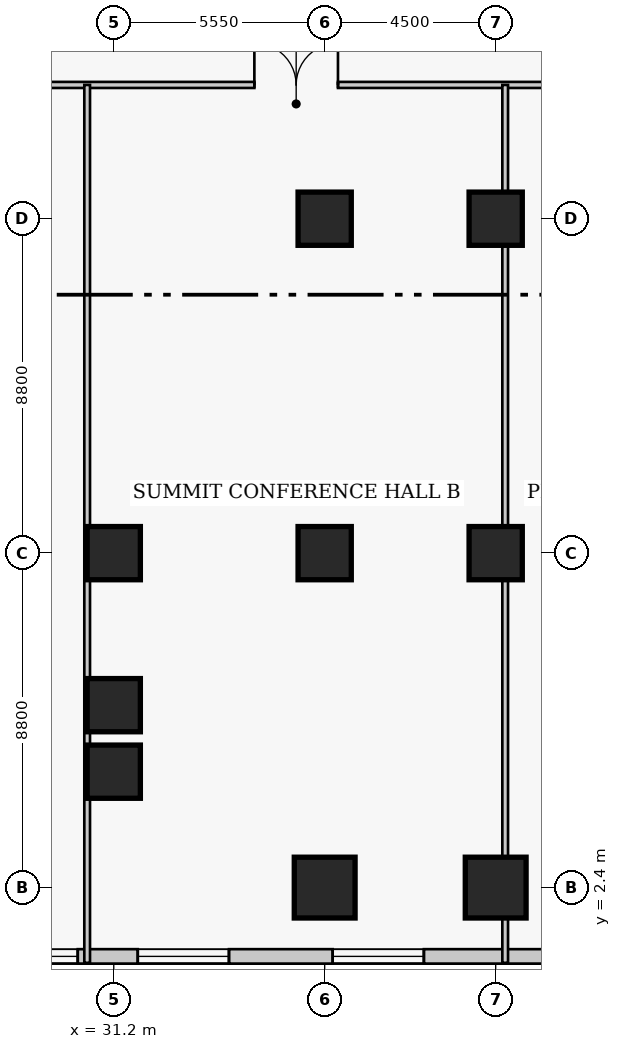
"""IFC4 building model, lengths in metres.
Left out: names, types, materials, properties, quantities, classifications, styles, units other than length and angle.
Written with IfcOpenShell. Run it as: python <this file> out.ifc"""

import sys

from ifc_helpers import new_model, si_unit, direction, frame, frame_2d, origin, origin_2d, place, context, subcontext, project, spatial, rectangle, extrude, element, fill, save


model = new_model("IFC4")
c1 = context("Model", 3, precision=1e-05, world=origin(), true_north=direction((0.0, 1.0)))
c2 = subcontext(c1, "Body", "Model", "MODEL_VIEW")
j1 = project(units=[si_unit("LENGTHUNIT", "METRE"), si_unit("PLANEANGLEUNIT", "RADIAN")], contexts=[c1])
p1 = place(None, origin())
s1 = spatial("IfcSite", under=j1, at=p1, CompositionType="ELEMENT")
p2 = place(p1, origin())
s2 = spatial("IfcBuilding", under=s1, at=p2, CompositionType="ELEMENT")
p3 = place(p2, frame((0.0, 0.0, 15.8)))
s3 = spatial("IfcBuildingStorey", under=s2, at=p3, CompositionType="ELEMENT", Elevation=15.8)
p4 = place(p3, frame((31.2, 11.2, 0.0), z_axis=(0.0, 0.0, 1.0), x_axis=(1.0, 0.0, 0.0)))
e1 = element("IfcColumn", 1, at=p4, inside=s3, PredefinedType="COLUMN", context=c2, shape_type="SweptSolid", body=[
    extrude(rectangle(XDim=1.4, YDim=1.4, at=origin_2d()), origin(), (0.0, 0.0, 1.0), 5.0),
])
p5 = place(p3, frame((36.75, 2.4, 0.0), z_axis=(0.0, 0.0, 1.0), x_axis=(1.0, 0.0, 0.0)))
e2 = element("IfcColumn", 2, at=p5, inside=s3, PredefinedType="COLUMN", context=c2, shape_type="SweptSolid", body=[
    extrude(rectangle(XDim=1.6, YDim=1.6, at=origin_2d()), origin(), (0.0, 0.0, 1.0), 5.0),
])
for number, where, z_axis, x_axis in (
    (3, (36.75, 11.2, 0.0), (0.0, 0.0, 1.0), (1.0, 0.0, 0.0)),
    (4, (36.75, 20.0, 0.0), (0.0, 0.0, 1.0), (1.0, 0.0, 0.0)),
):
    element("IfcColumn", number, at=place(p3, frame(where, z_axis=z_axis, x_axis=x_axis)), inside=s3, PredefinedType="COLUMN", context=c2, shape_type="SweptSolid", body=[
        extrude(rectangle(XDim=1.4, YDim=1.4, at=origin_2d()), origin(), (0.0, 0.0, 1.0), 5.0),
    ])
p6 = place(p3, frame((41.25, 2.4, 0.0), z_axis=(0.0, 0.0, 1.0), x_axis=(1.0, 0.0, 0.0)))
e5 = element("IfcColumn", 5, at=p6, inside=s3, PredefinedType="COLUMN", context=c2, shape_type="SweptSolid", body=[
    extrude(rectangle(XDim=1.6, YDim=1.6, at=origin_2d()), origin(), (0.0, 0.0, 1.0), 5.0),
])
for number, where, z_axis, x_axis in (
    (6, (41.25, 11.2, 0.0), (0.0, 0.0, 1.0), (1.0, 0.0, 0.0)),
    (7, (41.25, 20.0, 0.0), (0.0, 0.0, 1.0), (1.0, 0.0, 0.0)),
    (8, (31.2, 7.2, 0.0), (0.0, 0.0, 1.0), (1.0, 0.0, 0.0)),
    (9, (31.2, 5.45, 0.0), (0.0, 0.0, 1.0), (1.0, 0.0, 0.0)),
):
    element("IfcColumn", number, at=place(p3, frame(where, z_axis=z_axis, x_axis=x_axis)), inside=s3, PredefinedType="COLUMN", context=c2, shape_type="SweptSolid", body=[
        extrude(rectangle(XDim=1.4, YDim=1.4, at=origin_2d()), origin(), (0.0, 0.0, 1.0), 5.0),
    ])
p7 = place(p3, frame((-0.79, 0.59, 0.0), z_axis=(0.0, 0.0, 1.0), x_axis=(1.0, 0.0, 0.0)))
e10 = element("IfcWall", 10, at=p7, inside=s3, PredefinedType="SOLIDWALL", context=c2, shape_type="SweptSolid", body=[
    extrude(rectangle(XDim=79.58, YDim=0.38, at=frame_2d((39.79, 0.0))), origin(), (0.0, 0.0, 1.0), 4.58),
])
p8 = place(p7, frame((1.439, 0.0, 0.75)))
e11 = element("IfcOpeningElement", 11, at=p8, cuts=e10, PredefinedType="OPENING", context=c2, shape_type="SweptSolid", body=[
    extrude(rectangle(XDim=2.4, YDim=2.2, at=frame_2d((1.2, 1.1))), frame((0.0, 0.2, 0.0), z_axis=(0.0, -1.0, 0.0), x_axis=(1.0, 0.0, 0.0)), (0.0, 0.0, 1.0), 0.4),
])
p9 = place(p7, frame((4.769, 0.0, 0.75)))
e12 = element("IfcOpeningElement", 12, at=p9, cuts=e10, PredefinedType="OPENING", context=c2, shape_type="SweptSolid", body=[
    extrude(rectangle(XDim=2.4, YDim=2.2, at=frame_2d((1.2, 1.1))), frame((0.0, 0.2, 0.0), z_axis=(0.0, -1.0, 0.0), x_axis=(1.0, 0.0, 0.0)), (0.0, 0.0, 1.0), 0.4),
])
p10 = place(p7, frame((16.706, 0.0, 0.75)))
e13 = element("IfcOpeningElement", 13, at=p10, cuts=e10, PredefinedType="OPENING", context=c2, shape_type="SweptSolid", body=[
    extrude(rectangle(XDim=2.4, YDim=2.2, at=frame_2d((1.2, 1.1))), frame((0.0, 0.2, 0.0), z_axis=(0.0, -1.0, 0.0), x_axis=(1.0, 0.0, 0.0)), (0.0, 0.0, 1.0), 0.4),
])
p11 = place(p7, frame((20.685, 0.0, 0.75)))
e14 = element("IfcOpeningElement", 14, at=p11, cuts=e10, PredefinedType="OPENING", context=c2, shape_type="SweptSolid", body=[
    extrude(rectangle(XDim=2.4, YDim=2.2, at=frame_2d((1.2, 1.1))), frame((0.0, 0.2, 0.0), z_axis=(0.0, -1.0, 0.0), x_axis=(1.0, 0.0, 0.0)), (0.0, 0.0, 1.0), 0.4),
])
p12 = place(p7, frame((24.664, 0.0, 0.75)))
e15 = element("IfcOpeningElement", 15, at=p12, cuts=e10, PredefinedType="OPENING", context=c2, shape_type="SweptSolid", body=[
    extrude(rectangle(XDim=2.4, YDim=2.2, at=frame_2d((1.2, 1.1))), frame((0.0, 0.2, 0.0), z_axis=(0.0, -1.0, 0.0), x_axis=(1.0, 0.0, 0.0)), (0.0, 0.0, 1.0), 0.4),
])
p13 = place(p7, frame((28.643, 0.0, 0.75)))
e16 = element("IfcOpeningElement", 16, at=p13, cuts=e10, PredefinedType="OPENING", context=c2, shape_type="SweptSolid", body=[
    extrude(rectangle(XDim=2.4, YDim=2.2, at=frame_2d((1.2, 1.1))), frame((0.0, 0.2, 0.0), z_axis=(0.0, -1.0, 0.0), x_axis=(1.0, 0.0, 0.0)), (0.0, 0.0, 1.0), 0.4),
])
p14 = place(p7, frame((32.622, 0.0, 0.75)))
e17 = element("IfcOpeningElement", 17, at=p14, cuts=e10, PredefinedType="OPENING", context=c2, shape_type="SweptSolid", body=[
    extrude(rectangle(XDim=2.4, YDim=2.2, at=frame_2d((1.2, 1.1))), frame((0.0, 0.2, 0.0), z_axis=(0.0, -1.0, 0.0), x_axis=(1.0, 0.0, 0.0)), (0.0, 0.0, 1.0), 0.4),
])
p15 = place(p7, frame((37.75, 0.0, 0.75)))
e18 = element("IfcOpeningElement", 18, at=p15, cuts=e10, PredefinedType="OPENING", context=c2, shape_type="SweptSolid", body=[
    extrude(rectangle(XDim=2.4, YDim=2.2, at=frame_2d((1.2, 1.1))), frame((0.0, 0.2, 0.0), z_axis=(0.0, -1.0, 0.0), x_axis=(1.0, 0.0, 0.0)), (0.0, 0.0, 1.0), 0.4),
])
p16 = place(p7, frame((44.559, 0.0, 0.75)))
e19 = element("IfcOpeningElement", 19, at=p16, cuts=e10, PredefinedType="OPENING", context=c2, shape_type="SweptSolid", body=[
    extrude(rectangle(XDim=2.4, YDim=2.2, at=frame_2d((1.2, 1.1))), frame((0.0, 0.2, 0.0), z_axis=(0.0, -1.0, 0.0), x_axis=(1.0, 0.0, 0.0)), (0.0, 0.0, 1.0), 0.4),
])
p17 = place(p7, frame((48.538, 0.0, 0.75)))
e20 = element("IfcOpeningElement", 20, at=p17, cuts=e10, PredefinedType="OPENING", context=c2, shape_type="SweptSolid", body=[
    extrude(rectangle(XDim=2.4, YDim=2.2, at=frame_2d((1.2, 1.1))), frame((0.0, 0.2, 0.0), z_axis=(0.0, -1.0, 0.0), x_axis=(1.0, 0.0, 0.0)), (0.0, 0.0, 1.0), 0.4),
])
p18 = place(p7, frame((56.496, 0.0, 0.75)))
e21 = element("IfcOpeningElement", 21, at=p18, cuts=e10, PredefinedType="OPENING", context=c2, shape_type="SweptSolid", body=[
    extrude(rectangle(XDim=2.4, YDim=2.2, at=frame_2d((1.2, 1.1))), frame((0.0, 0.2, 0.0), z_axis=(0.0, -1.0, 0.0), x_axis=(1.0, 0.0, 0.0)), (0.0, 0.0, 1.0), 0.4),
])
p19 = place(p7, frame((60.475, 0.0, 0.75)))
e22 = element("IfcOpeningElement", 22, at=p19, cuts=e10, PredefinedType="OPENING", context=c2, shape_type="SweptSolid", body=[
    extrude(rectangle(XDim=2.4, YDim=2.2, at=frame_2d((1.2, 1.1))), frame((0.0, 0.2, 0.0), z_axis=(0.0, -1.0, 0.0), x_axis=(1.0, 0.0, 0.0)), (0.0, 0.0, 1.0), 0.4),
])
p20 = place(p7, frame((64.454, 0.0, 0.75)))
e23 = element("IfcOpeningElement", 23, at=p20, cuts=e10, PredefinedType="OPENING", context=c2, shape_type="SweptSolid", body=[
    extrude(rectangle(XDim=2.4, YDim=2.2, at=frame_2d((1.2, 1.1))), frame((0.0, 0.2, 0.0), z_axis=(0.0, -1.0, 0.0), x_axis=(1.0, 0.0, 0.0)), (0.0, 0.0, 1.0), 0.4),
])
p21 = place(p7, frame((68.433, 0.0, 0.75)))
e24 = element("IfcOpeningElement", 24, at=p21, cuts=e10, PredefinedType="OPENING", context=c2, shape_type="SweptSolid", body=[
    extrude(rectangle(XDim=2.4, YDim=2.2, at=frame_2d((1.2, 1.1))), frame((0.0, 0.2, 0.0), z_axis=(0.0, -1.0, 0.0), x_axis=(1.0, 0.0, 0.0)), (0.0, 0.0, 1.0), 0.4),
])
p22 = place(p7, frame((72.412, 0.0, 0.75)))
e25 = element("IfcOpeningElement", 25, at=p22, cuts=e10, PredefinedType="OPENING", context=c2, shape_type="SweptSolid", body=[
    extrude(rectangle(XDim=2.4, YDim=2.2, at=frame_2d((1.2, 1.1))), frame((0.0, 0.2, 0.0), z_axis=(0.0, -1.0, 0.0), x_axis=(1.0, 0.0, 0.0)), (0.0, 0.0, 1.0), 0.4),
])
p23 = place(p7, frame((75.74, 0.0, 0.75)))
e26 = element("IfcOpeningElement", 26, at=p23, cuts=e10, PredefinedType="OPENING", context=c2, shape_type="SweptSolid", body=[
    extrude(rectangle(XDim=2.4, YDim=2.2, at=frame_2d((1.2, 1.1))), frame((0.0, 0.2, 0.0), z_axis=(0.0, -1.0, 0.0), x_axis=(1.0, 0.0, 0.0)), (0.0, 0.0, 1.0), 0.4),
])
p24 = place(p3, frame((-2.98, 23.52, 0.0), z_axis=(0.0, 0.0, 1.0), x_axis=(1.0, 0.0, 0.0)))
e27 = element("IfcWall", 27, at=p24, inside=s3, PredefinedType="PARTITIONING", context=c2, shape_type="SweptSolid", body=[
    extrude(rectangle(XDim=83.96, YDim=0.16, at=frame_2d((41.98, 0.0))), origin(), (0.0, 0.0, 1.0), 4.58),
])
p25 = place(p24, frame((7.13, 0.0, 0.0)))
e28 = element("IfcOpeningElement", 28, at=p25, cuts=e27, PredefinedType="OPENING", context=c2, shape_type="SweptSolid", body=[
    extrude(rectangle(XDim=1.0, YDim=2.15, at=frame_2d((0.5, 1.075))), frame((0.0, 0.09, 0.0), z_axis=(0.0, -1.0, 0.0), x_axis=(1.0, 0.0, 0.0)), (0.0, 0.0, 1.0), 0.18),
])
p26 = place(p24, frame((11.96, 0.0, 0.0)))
e29 = element("IfcOpeningElement", 29, at=p26, cuts=e27, PredefinedType="OPENING", context=c2, shape_type="SweptSolid", body=[
    extrude(rectangle(XDim=1.1, YDim=2.15, at=frame_2d((0.55, 1.075))), frame((0.0, 0.09, 0.0), z_axis=(0.0, -1.0, 0.0), x_axis=(1.0, 0.0, 0.0)), (0.0, 0.0, 1.0), 0.18),
])
p27 = place(p24, frame((15.205, 0.0, 0.0)))
e30 = element("IfcOpeningElement", 30, at=p27, cuts=e27, PredefinedType="OPENING", context=c2, shape_type="SweptSolid", body=[
    extrude(rectangle(XDim=0.95, YDim=2.1, at=frame_2d((0.475, 1.05))), frame((0.0, 0.09, 0.0), z_axis=(0.0, -1.0, 0.0), x_axis=(1.0, 0.0, 0.0)), (0.0, 0.0, 1.0), 0.18),
])
p28 = place(p24, frame((26.88, 0.0, 0.0)))
e31 = element("IfcOpeningElement", 31, at=p28, cuts=e27, PredefinedType="OPENING", context=c2, shape_type="SweptSolid", body=[
    extrude(rectangle(XDim=2.2, YDim=2.4, at=frame_2d((1.1, 1.2))), frame((0.0, 0.09, 0.0), z_axis=(0.0, -1.0, 0.0), x_axis=(1.0, 0.0, 0.0)), (0.0, 0.0, 1.0), 0.18),
])
p29 = place(p24, frame((37.88, 0.0, 0.0)))
e32 = element("IfcOpeningElement", 32, at=p29, cuts=e27, PredefinedType="OPENING", context=c2, shape_type="SweptSolid", body=[
    extrude(rectangle(XDim=2.2, YDim=2.4, at=frame_2d((1.1, 1.2))), frame((0.0, 0.09, 0.0), z_axis=(0.0, -1.0, 0.0), x_axis=(1.0, 0.0, 0.0)), (0.0, 0.0, 1.0), 0.18),
])
p30 = place(p24, frame((48.63, 0.0, 0.0)))
e33 = element("IfcOpeningElement", 33, at=p30, cuts=e27, PredefinedType="OPENING", context=c2, shape_type="SweptSolid", body=[
    extrude(rectangle(XDim=2.2, YDim=2.4, at=frame_2d((1.1, 1.2))), frame((0.0, 0.09, 0.0), z_axis=(0.0, -1.0, 0.0), x_axis=(1.0, 0.0, 0.0)), (0.0, 0.0, 1.0), 0.18),
])
p31 = place(p24, frame((59.08, 0.0, 0.0)))
e34 = element("IfcOpeningElement", 34, at=p31, cuts=e27, PredefinedType="OPENING", context=c2, shape_type="SweptSolid", body=[
    extrude(rectangle(XDim=2.2, YDim=2.4, at=frame_2d((1.1, 1.2))), frame((0.0, 0.09, 0.0), z_axis=(0.0, -1.0, 0.0), x_axis=(1.0, 0.0, 0.0)), (0.0, 0.0, 1.0), 0.18),
])
p32 = place(p24, frame((67.34, 0.0, 0.0)))
e35 = element("IfcOpeningElement", 35, at=p32, cuts=e27, PredefinedType="OPENING", context=c2, shape_type="SweptSolid", body=[
    extrude(rectangle(XDim=0.88, YDim=2.05, at=frame_2d((0.44, 1.025))), frame((0.0, 0.09, 0.0), z_axis=(0.0, -1.0, 0.0), x_axis=(1.0, 0.0, 0.0)), (0.0, 0.0, 1.0), 0.18),
])
p33 = place(p24, frame((76.29, 0.0, 0.0)))
e36 = element("IfcOpeningElement", 36, at=p33, cuts=e27, PredefinedType="OPENING", context=c2, shape_type="SweptSolid", body=[
    extrude(rectangle(XDim=0.88, YDim=2.05, at=frame_2d((0.44, 1.025))), frame((0.0, 0.09, 0.0), z_axis=(0.0, -1.0, 0.0), x_axis=(1.0, 0.0, 0.0)), (0.0, 0.0, 1.0), 0.18),
])
p34 = place(p3, frame((30.5, 0.42, 0.0), z_axis=(0.0, 0.0, 1.0), x_axis=(0.0, 1.0, 0.0)))
e37 = element("IfcWall", 37, at=p34, inside=s3, PredefinedType="PARTITIONING", context=c2, shape_type="SweptSolid", body=[
    extrude(rectangle(XDim=23.1, YDim=0.15, at=frame_2d((11.55, 0.0))), origin(), (0.0, 0.0, 1.0), 4.58),
])
p35 = place(p3, frame((41.5, 0.42, 0.0), z_axis=(0.0, 0.0, 1.0), x_axis=(0.0, 1.0, 0.0)))
e38 = element("IfcWall", 38, at=p35, inside=s3, PredefinedType="PARTITIONING", context=c2, shape_type="SweptSolid", body=[
    extrude(rectangle(XDim=23.1, YDim=0.15, at=frame_2d((11.55, 0.0))), origin(), (0.0, 0.0, 1.0), 3.54),
])
p36 = place(p13, origin())
e39 = element("IfcWindow", 39, at=p36, inside=s3, PartitioningType="SINGLE_PANEL", PredefinedType="WINDOW", context=c2, shape_type="SweptSolid", body=[
    extrude(rectangle(XDim=2.4, YDim=2.2, at=frame_2d((1.2, 1.1))), frame((0.0, 0.03, 0.0), z_axis=(0.0, -1.0, 0.0), x_axis=(1.0, 0.0, 0.0)), (0.0, 0.0, 1.0), 0.06),
])
fill(e16, e39)
p37 = place(p14, origin())
e40 = element("IfcWindow", 40, at=p37, inside=s3, PartitioningType="SINGLE_PANEL", PredefinedType="WINDOW", context=c2, shape_type="SweptSolid", body=[
    extrude(rectangle(XDim=2.4, YDim=2.2, at=frame_2d((1.2, 1.1))), frame((0.0, 0.03, 0.0), z_axis=(0.0, -1.0, 0.0), x_axis=(1.0, 0.0, 0.0)), (0.0, 0.0, 1.0), 0.06),
])
fill(e17, e40)
p38 = place(p15, origin())
e41 = element("IfcWindow", 41, at=p38, inside=s3, PartitioningType="SINGLE_PANEL", PredefinedType="WINDOW", context=c2, shape_type="SweptSolid", body=[
    extrude(rectangle(XDim=2.4, YDim=2.2, at=frame_2d((1.2, 1.1))), frame((0.0, 0.03, 0.0), z_axis=(0.0, -1.0, 0.0), x_axis=(1.0, 0.0, 0.0)), (0.0, 0.0, 1.0), 0.06),
])
fill(e18, e41)
p39 = place(p29, origin())
e42 = element("IfcDoor", 42, at=p39, inside=s3, OperationType="DOUBLE_DOOR_SINGLE_SWING", PredefinedType="DOOR", context=c2, shape_type="SweptSolid", body=[
    extrude(rectangle(XDim=2.2, YDim=2.4, at=frame_2d((1.1, 1.2))), frame((0.0, 0.025, 0.0), z_axis=(0.0, -1.0, 0.0), x_axis=(1.0, 0.0, 0.0)), (0.0, 0.0, 1.0), 0.05),
])
fill(e32, e42)
save(model, sys.argv[1])
